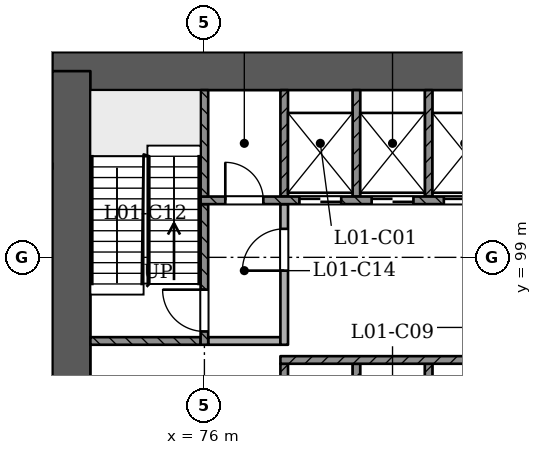
"""IFC4 building model, lengths in metres.
Left out: names, types, materials, properties, quantities, classifications, styles, units other than length and angle.
Written with IfcOpenShell. Run it as: python <this file> out.ifc"""

import sys

from ifc_helpers import new_model, si_unit, direction, frame, frame_2d, origin, place, context, subcontext, project, spatial, rectangle, extrude, element, fill, save


model = new_model("IFC4")
c1 = context("Model", 3, precision=1e-05, world=origin(), true_north=direction((0.0, 1.0)))
c2 = subcontext(c1, "Body", "Model", "MODEL_VIEW")
j1 = project(units=[si_unit("LENGTHUNIT", "METRE"), si_unit("PLANEANGLEUNIT", "RADIAN")], contexts=[c1])
p1 = place(None, origin())
s1 = spatial("IfcSite", under=j1, at=p1, CompositionType="ELEMENT")
p2 = place(p1, origin())
s2 = spatial("IfcBuilding", under=s1, at=p2, CompositionType="ELEMENT")
p3 = place(p2, frame((0.0, 0.0, 9.0)))
s3 = spatial("IfcBuildingStorey", under=s2, at=p3, CompositionType="ELEMENT", Elevation=9.0)
p4 = place(p3, frame((97.5, 103.9, 0.0), z_axis=(0.0, 0.0, 1.0), x_axis=(-1.0, 0.0, 0.0)))
e1 = element("IfcWall", 1, at=p4, inside=s3, PredefinedType="SHEAR", context=c2, shape_type="SweptSolid", body=[
    extrude(rectangle(XDim=25.5, YDim=1.0, at=frame_2d((12.75, 0.0))), origin(), (0.0, 0.0, 1.0), 4.5),
])
p5 = place(p3, frame((72.5, 103.9, 0.0), z_axis=(0.0, 0.0, 1.0), x_axis=(0.0, -1.0, 0.0)))
e2 = element("IfcWall", 2, at=p5, inside=s3, PredefinedType="SHEAR", context=c2, shape_type="SweptSolid", body=[
    extrude(rectangle(XDim=11.5, YDim=1.0, at=frame_2d((5.75, 0.0))), origin(), (0.0, 0.0, 1.0), 4.5),
])
for number, where, z_axis, x_axis in (
    (3, (78.1, 93.4, 0.0), (0.0, 0.0, 1.0), (0.0, 1.0, 0.0)),
    (4, (80.0, 93.4, 0.0), (0.0, 0.0, 1.0), (0.0, 1.0, 0.0)),
    (5, (81.9, 93.4, 0.0), (0.0, 0.0, 1.0), (0.0, 1.0, 0.0)),
):
    element("IfcWall", number, at=place(p3, frame(where, z_axis=z_axis, x_axis=x_axis)), inside=s3, PredefinedType="SOLIDWALL", context=c2, shape_type="SweptSolid", body=[
        extrude(rectangle(XDim=2.8, YDim=0.2, at=frame_2d((1.4, 0.0))), origin(), (0.0, 0.0, 1.0), 4.05),
    ])
p6 = place(p3, frame((78.0, 96.3, 0.0), z_axis=(0.0, 0.0, 1.0), x_axis=(1.0, 0.0, 0.0)))
e6 = element("IfcWall", 6, at=p6, inside=s3, PredefinedType="SOLIDWALL", context=c2, shape_type="SweptSolid", body=[
    extrude(rectangle(XDim=7.8, YDim=0.2, at=frame_2d((3.9, 0.0))), origin(), (0.0, 0.0, 1.0), 4.05),
])
p7 = place(p3, frame((73.0, 96.8, 0.0), z_axis=(0.0, 0.0, 1.0), x_axis=(1.0, 0.0, 0.0)))
e7 = element("IfcWall", 7, at=p7, inside=s3, PredefinedType="SOLIDWALL", context=c2, shape_type="SweptSolid", body=[
    extrude(rectangle(XDim=2.9, YDim=0.2, at=frame_2d((1.45, 0.0))), origin(), (0.0, 0.0, 1.0), 4.05),
])
p8 = place(p3, frame((76.0, 96.7, 0.0), z_axis=(0.0, 0.0, 1.0), x_axis=(0.0, 1.0, 0.0)))
e8 = element("IfcWall", 8, at=p8, inside=s3, PredefinedType="SOLIDWALL", context=c2, shape_type="SweptSolid", body=[
    extrude(rectangle(XDim=3.7, YDim=0.2, at=frame_2d((1.85, 0.0))), origin(), (0.0, 0.0, 1.0), 4.05),
])
p9 = place(p8, frame((0.35, 0.0, 0.0)))
e9 = element("IfcOpeningElement", 9, at=p9, cuts=e8, PredefinedType="OPENING", context=c2, shape_type="SweptSolid", body=[
    extrude(rectangle(XDim=1.1, YDim=2.1, at=frame_2d((0.55, 1.05))), frame((0.0, 0.11, 0.0), z_axis=(0.0, -1.0, 0.0), x_axis=(1.0, 0.0, 0.0)), (0.0, 0.0, 1.0), 0.221),
])
p10 = place(p3, frame((76.1, 96.8, 0.0), z_axis=(0.0, 0.0, 1.0), x_axis=(1.0, 0.0, 0.0)))
e10 = element("IfcWall", 10, at=p10, inside=s3, PredefinedType="PARTITIONING", context=c2, shape_type="SweptSolid", body=[
    extrude(rectangle(XDim=1.9, YDim=0.2, at=frame_2d((0.95, 0.0))), origin(), (0.0, 0.0, 1.0), 4.05),
])
p11 = place(p3, frame((78.1, 96.7, 0.0), z_axis=(0.0, 0.0, 1.0), x_axis=(0.0, 1.0, 0.0)))
e11 = element("IfcWall", 11, at=p11, inside=s3, PredefinedType="PARTITIONING", context=c2, shape_type="SweptSolid", body=[
    extrude(rectangle(XDim=3.7, YDim=0.2, at=frame_2d((1.85, 0.0))), origin(), (0.0, 0.0, 1.0), 4.05),
])
p12 = place(p11, frame((1.95, 0.0, 0.0)))
e12 = element("IfcOpeningElement", 12, at=p12, cuts=e11, PredefinedType="OPENING", context=c2, shape_type="SweptSolid", body=[
    extrude(rectangle(XDim=1.1, YDim=2.1, at=frame_2d((0.55, 1.05))), frame((0.0, 0.11, 0.0), z_axis=(0.0, -1.0, 0.0), x_axis=(1.0, 0.0, 0.0)), (0.0, 0.0, 1.0), 0.221),
])
p13 = place(p3, frame((75.9, 100.5, 0.0), z_axis=(0.0, 0.0, 1.0), x_axis=(1.0, 0.0, 0.0)))
e13 = element("IfcWall", 13, at=p13, inside=s3, PredefinedType="SOLIDWALL", context=c2, shape_type="SweptSolid", body=[
    extrude(rectangle(XDim=18.2, YDim=0.2, at=frame_2d((9.1, 0.0))), origin(), (0.0, 0.0, 1.0), 4.05),
])
p14 = place(p13, frame((2.6, 0.0, 0.0)))
e14 = element("IfcOpeningElement", 14, at=p14, cuts=e13, PredefinedType="OPENING", context=c2, shape_type="SweptSolid", body=[
    extrude(rectangle(XDim=1.1, YDim=2.1, at=frame_2d((0.55, 1.05))), frame((0.0, 0.11, 0.0), z_axis=(0.0, -1.0, 0.0), x_axis=(1.0, 0.0, 0.0)), (0.0, 0.0, 1.0), 0.221),
])
p15 = place(p13, frame((4.5, 0.0, 0.0)))
e15 = element("IfcOpeningElement", 15, at=p15, cuts=e13, PredefinedType="OPENING", context=c2, shape_type="SweptSolid", body=[
    extrude(rectangle(XDim=1.1, YDim=2.1, at=frame_2d((0.55, 1.05))), frame((0.0, 0.11, 0.0), z_axis=(0.0, -1.0, 0.0), x_axis=(1.0, 0.0, 0.0)), (0.0, 0.0, 1.0), 0.221),
])
p16 = place(p13, frame((6.4, 0.0, 0.0)))
e16 = element("IfcOpeningElement", 16, at=p16, cuts=e13, PredefinedType="OPENING", context=c2, shape_type="SweptSolid", body=[
    extrude(rectangle(XDim=1.1, YDim=2.1, at=frame_2d((0.55, 1.05))), frame((0.0, 0.11, 0.0), z_axis=(0.0, -1.0, 0.0), x_axis=(1.0, 0.0, 0.0)), (0.0, 0.0, 1.0), 0.221),
])
p17 = place(p13, frame((8.3, 0.0, 0.0)))
e17 = element("IfcOpeningElement", 17, at=p17, cuts=e13, PredefinedType="OPENING", context=c2, shape_type="SweptSolid", body=[
    extrude(rectangle(XDim=1.1, YDim=2.1, at=frame_2d((0.55, 1.05))), frame((0.0, 0.11, 0.0), z_axis=(0.0, -1.0, 0.0), x_axis=(1.0, 0.0, 0.0)), (0.0, 0.0, 1.0), 0.221),
])
p18 = place(p13, frame((10.2, 0.0, 0.0)))
e18 = element("IfcOpeningElement", 18, at=p18, cuts=e13, PredefinedType="OPENING", context=c2, shape_type="SweptSolid", body=[
    extrude(rectangle(XDim=1.1, YDim=2.1, at=frame_2d((0.55, 1.05))), frame((0.0, 0.11, 0.0), z_axis=(0.0, -1.0, 0.0), x_axis=(1.0, 0.0, 0.0)), (0.0, 0.0, 1.0), 0.221),
])
p19 = place(p13, frame((12.1, 0.0, 0.0)))
e19 = element("IfcOpeningElement", 19, at=p19, cuts=e13, PredefinedType="OPENING", context=c2, shape_type="SweptSolid", body=[
    extrude(rectangle(XDim=1.1, YDim=2.1, at=frame_2d((0.55, 1.05))), frame((0.0, 0.11, 0.0), z_axis=(0.0, -1.0, 0.0), x_axis=(1.0, 0.0, 0.0)), (0.0, 0.0, 1.0), 0.221),
])
p20 = place(p13, frame((14.0, 0.0, 0.0)))
e20 = element("IfcOpeningElement", 20, at=p20, cuts=e13, PredefinedType="OPENING", context=c2, shape_type="SweptSolid", body=[
    extrude(rectangle(XDim=1.1, YDim=2.1, at=frame_2d((0.55, 1.05))), frame((0.0, 0.11, 0.0), z_axis=(0.0, -1.0, 0.0), x_axis=(1.0, 0.0, 0.0)), (0.0, 0.0, 1.0), 0.221),
])
p21 = place(p13, frame((0.65, 0.0, 0.0)))
e21 = element("IfcOpeningElement", 21, at=p21, cuts=e13, PredefinedType="OPENING", context=c2, shape_type="SweptSolid", body=[
    extrude(rectangle(XDim=1.0, YDim=2.1, at=frame_2d((0.5, 1.05))), frame((0.0, 0.11, 0.0), z_axis=(0.0, -1.0, 0.0), x_axis=(1.0, 0.0, 0.0)), (0.0, 0.0, 1.0), 0.221),
])
p22 = place(p13, frame((16.3, 0.0, 0.0)))
e22 = element("IfcOpeningElement", 22, at=p22, cuts=e13, PredefinedType="OPENING", context=c2, shape_type="SweptSolid", body=[
    extrude(rectangle(XDim=1.0, YDim=2.1, at=frame_2d((0.5, 1.05))), frame((0.0, 0.11, 0.0), z_axis=(0.0, -1.0, 0.0), x_axis=(1.0, 0.0, 0.0)), (0.0, 0.0, 1.0), 0.221),
])
for number, where, z_axis, x_axis in (
    (23, (76.0, 100.6, 0.0), (0.0, 0.0, 1.0), (0.0, 1.0, 0.0)),
    (24, (78.1, 100.6, 0.0), (0.0, 0.0, 1.0), (0.0, 1.0, 0.0)),
    (25, (80.0, 100.6, 0.0), (0.0, 0.0, 1.0), (0.0, 1.0, 0.0)),
    (26, (81.9, 100.6, 0.0), (0.0, 0.0, 1.0), (0.0, 1.0, 0.0)),
):
    element("IfcWall", number, at=place(p3, frame(where, z_axis=z_axis, x_axis=x_axis)), inside=s3, PredefinedType="SOLIDWALL", context=c2, shape_type="SweptSolid", body=[
        extrude(rectangle(XDim=2.8, YDim=0.2, at=frame_2d((1.4, 0.0))), origin(), (0.0, 0.0, 1.0), 4.05),
    ])
p23 = place(p14, origin())
e27 = element("IfcDoor", 27, at=p23, inside=s3, OperationType="SLIDING_TO_RIGHT", PredefinedType="NOTDEFINED", context=c2, shape_type="SweptSolid", body=[
    extrude(rectangle(XDim=1.1, YDim=2.1, at=frame_2d((0.55, 1.05))), frame((0.0, 0.025, 0.0), z_axis=(0.0, -1.0, 0.0), x_axis=(1.0, 0.0, 0.0)), (0.0, 0.0, 1.0), 0.05),
])
fill(e14, e27)
p24 = place(p15, origin())
e28 = element("IfcDoor", 28, at=p24, inside=s3, OperationType="SLIDING_TO_LEFT", PredefinedType="NOTDEFINED", context=c2, shape_type="SweptSolid", body=[
    extrude(rectangle(XDim=1.1, YDim=2.1, at=frame_2d((0.55, 1.05))), frame((0.0, 0.025, 0.0), z_axis=(0.0, -1.0, 0.0), x_axis=(1.0, 0.0, 0.0)), (0.0, 0.0, 1.0), 0.05),
])
fill(e15, e28)
p25 = place(p16, origin())
e29 = element("IfcDoor", 29, at=p25, inside=s3, OperationType="SLIDING_TO_RIGHT", PredefinedType="NOTDEFINED", context=c2, shape_type="SweptSolid", body=[
    extrude(rectangle(XDim=1.1, YDim=2.1, at=frame_2d((0.55, 1.05))), frame((0.0, 0.025, 0.0), z_axis=(0.0, -1.0, 0.0), x_axis=(1.0, 0.0, 0.0)), (0.0, 0.0, 1.0), 0.05),
])
fill(e16, e29)
p26 = place(p9, origin())
e30 = element("IfcDoor", 30, at=p26, inside=s3, OperationType="SINGLE_SWING_RIGHT", PredefinedType="NOTDEFINED", context=c2, shape_type="SweptSolid", body=[
    extrude(rectangle(XDim=1.1, YDim=2.1, at=frame_2d((0.55, 1.05))), frame((0.0, 0.025, 0.0), z_axis=(0.0, -1.0, 0.0), x_axis=(1.0, 0.0, 0.0)), (0.0, 0.0, 1.0), 0.05),
])
fill(e9, e30)
p27 = place(p12, origin())
e31 = element("IfcDoor", 31, at=p27, inside=s3, OperationType="SINGLE_SWING_LEFT", PredefinedType="NOTDEFINED", context=c2, shape_type="SweptSolid", body=[
    extrude(rectangle(XDim=1.1, YDim=2.1, at=frame_2d((0.55, 1.05))), frame((0.0, 0.025, 0.0), z_axis=(0.0, -1.0, 0.0), x_axis=(1.0, 0.0, 0.0)), (0.0, 0.0, 1.0), 0.05),
])
fill(e12, e31)
p28 = place(p21, origin())
e32 = element("IfcDoor", 32, at=p28, inside=s3, OperationType="SINGLE_SWING_LEFT", PredefinedType="NOTDEFINED", context=c2, shape_type="SweptSolid", body=[
    extrude(rectangle(XDim=1.0, YDim=2.1, at=frame_2d((0.5, 1.05))), frame((0.0, 0.025, 0.0), z_axis=(0.0, -1.0, 0.0), x_axis=(1.0, 0.0, 0.0)), (0.0, 0.0, 1.0), 0.05),
])
fill(e21, e32)
save(model, sys.argv[1])
